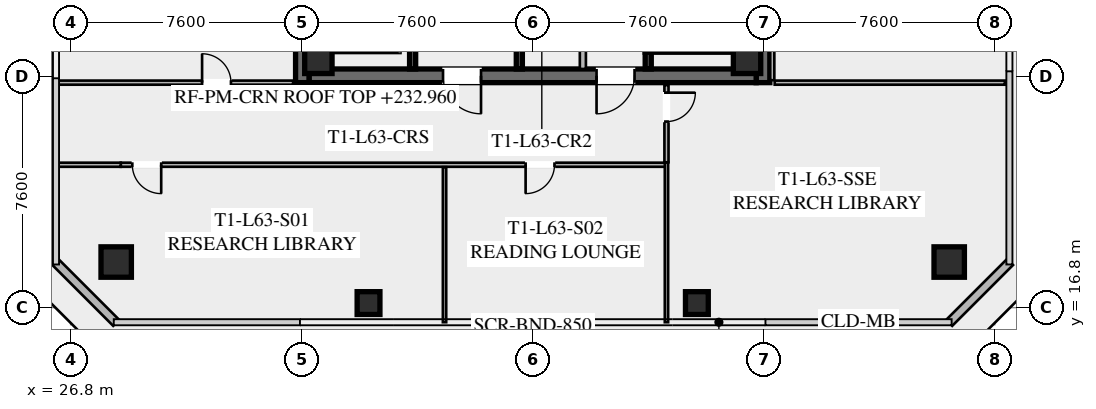
"""IFC4 building model, lengths in metres.
Left out: names, types, materials, properties, quantities, classifications, styles, units other than length and angle.
Written with IfcOpenShell. Run it as: python <this file> out.ifc"""

import sys

from ifc_helpers import new_model, si_unit, direction, frame, frame_2d, origin, origin_2d, place, context, subcontext, project, spatial, rectangle, hollow_rectangle, extrude, element, fill, save


model = new_model("IFC4")
c1 = context("Model", 3, precision=1e-05, world=origin(), true_north=direction((0.0, 1.0)))
c2 = subcontext(c1, "Body", "Model", "MODEL_VIEW")
j1 = project(units=[si_unit("LENGTHUNIT", "METRE"), si_unit("PLANEANGLEUNIT", "RADIAN")], contexts=[c1])
p1 = place(None, origin())
s1 = spatial("IfcSite", under=j1, at=p1, CompositionType="ELEMENT")
p2 = place(p1, origin())
s2 = spatial("IfcBuilding", under=s1, at=p2, CompositionType="ELEMENT")
p3 = place(p2, frame((0.0, 0.0, 232.6)))
s3 = spatial("IfcBuildingStorey", under=s2, at=p3, CompositionType="ELEMENT", Elevation=232.6)
for number, where, z_axis, x_axis in (
    (1, (34.425, 24.2, 0.0), (0.0, 0.0, 1.0), (0.0, 1.0, 0.0)),
    (2, (49.575, 39.8, 0.0), (0.0, 0.0, 1.0), (0.0, -1.0, 0.0)),
):
    element("IfcWall", number, at=place(p3, frame(where, z_axis=z_axis, x_axis=x_axis)), inside=s3, PredefinedType="SHEAR", context=c2, shape_type="SweptSolid", body=[
        extrude(rectangle(XDim=15.6, YDim=0.45, at=frame_2d((7.8, 0.0))), origin(), (0.0, 0.0, 1.0), 3.55),
    ])
p4 = place(p3, frame((49.35, 24.425, 0.0), z_axis=(0.0, 0.0, 1.0), x_axis=(-1.0, 0.0, 0.0)))
e3 = element("IfcWall", 3, at=p4, inside=s3, PredefinedType="SHEAR", context=c2, shape_type="SweptSolid", body=[
    extrude(rectangle(XDim=14.7, YDim=0.45, at=frame_2d((7.35, 0.0))), origin(), (0.0, 0.0, 1.0), 3.55),
])
p5 = place(p4, frame((9.05, 0.0, 0.0)))
e4 = element("IfcOpeningElement", 4, at=p5, cuts=e3, PredefinedType="OPENING", context=c2, shape_type="SweptSolid", body=[
    extrude(rectangle(XDim=1.25, YDim=2.25, at=frame_2d((0.625, 1.125))), frame((0.0, 0.235, 0.0), z_axis=(0.0, -1.0, 0.0), x_axis=(1.0, 0.0, 0.0)), (0.0, 0.0, 1.0), 0.47),
])
p6 = place(p4, frame((4.0, 0.0, 0.0)))
e5 = element("IfcOpeningElement", 5, at=p6, cuts=e3, PredefinedType="OPENING", context=c2, shape_type="SweptSolid", body=[
    extrude(rectangle(XDim=1.25, YDim=2.25, at=frame_2d((0.625, 1.125))), frame((0.0, 0.235, 0.0), z_axis=(0.0, -1.0, 0.0), x_axis=(1.0, 0.0, 0.0)), (0.0, 0.0, 1.0), 0.47),
])
for number, where, z_axis, x_axis in (
    (6, (34.95, 24.95, 0.0), (0.0, 0.0, 1.0), (1.0, 0.0, 0.0)),
    (7, (49.05, 24.95, 0.0), (0.0, 0.0, 1.0), (1.0, 0.0, 0.0)),
):
    element("IfcColumn", number, at=place(p3, frame(where, z_axis=z_axis, x_axis=x_axis)), inside=s3, PredefinedType="COLUMN", context=c2, shape_type="SweptSolid", body=[
        extrude(hollow_rectangle(XDim=0.9, YDim=0.9, WallThickness=0.04, at=origin_2d()), origin(), (0.0, 0.0, 1.0), 3.37),
    ])
for number, where, z_axis, x_axis in (
    (8, (28.3, 18.3, -0.175), (0.0, 0.0, 1.0), (1.0, 0.0, 0.0)),
    (9, (55.7, 18.3, -0.175), (0.0, 0.0, 1.0), (1.0, 0.0, 0.0)),
):
    element("IfcColumn", number, at=place(p3, frame(where, z_axis=z_axis, x_axis=x_axis)), inside=s3, PredefinedType="COLUMN", context=c2, shape_type="SweptSolid", body=[
        extrude(hollow_rectangle(XDim=1.0, YDim=1.0, WallThickness=0.04, at=origin_2d()), origin(), (0.0, 0.0, 1.0), 3.545),
    ])
for number, where, z_axis, x_axis in (
    (10, (36.6, 16.95, -0.175), (0.0, 0.0, 1.0), (1.0, 0.0, 0.0)),
    (11, (47.4, 16.95, -0.175), (0.0, 0.0, 1.0), (1.0, 0.0, 0.0)),
):
    element("IfcColumn", number, at=place(p3, frame(where, z_axis=z_axis, x_axis=x_axis)), inside=s3, PredefinedType="COLUMN", context=c2, shape_type="SweptSolid", body=[
        extrude(hollow_rectangle(XDim=0.75, YDim=0.75, WallThickness=0.032, at=origin_2d()), origin(), (0.0, 0.0, 1.0), 3.545),
    ])
for number, where, z_axis, x_axis in (
    (12, (28.3, 16.3, 0.0), (0.0, 0.0, 1.0), (-0.707, 0.707, 0.0)),
    (13, (57.7, 18.3, 0.0), (0.0, 0.0, 1.0), (-0.707, -0.707, 0.0)),
):
    element("IfcWall", number, at=place(p3, frame(where, z_axis=z_axis, x_axis=x_axis)), inside=s3, PredefinedType="SOLIDWALL", context=c2, shape_type="SweptSolid", body=[
        extrude(rectangle(XDim=2.828, YDim=0.28, at=frame_2d((1.414, 0.0))), origin(), (0.0, 0.0, 1.0), 3.37),
    ])
p7 = place(p3, frame((45.8, 32.8, 0.0), z_axis=(0.0, 0.0, 1.0), x_axis=(0.0, -1.0, 0.0)))
e14 = element("IfcWall", 14, at=p7, inside=s3, PredefinedType="SHEAR", context=c2, shape_type="SweptSolid", body=[
    extrude(rectangle(XDim=8.15, YDim=0.2, at=frame_2d((4.075, 0.0))), origin(), (0.0, 0.0, 1.0), 3.37),
])
p8 = place(p7, frame((0.45, 0.0, 0.0)))
e15 = element("IfcOpeningElement", 15, at=p8, cuts=e14, PredefinedType="OPENING", context=c2, shape_type="SweptSolid", body=[
    extrude(rectangle(XDim=1.15, YDim=2.2, at=frame_2d((0.575, 1.1))), frame((0.0, 0.11, 0.0), z_axis=(0.0, -1.0, 0.0), x_axis=(1.0, 0.0, 0.0)), (0.0, 0.0, 1.0), 0.22),
])
p9 = place(p3, frame((41.56, 24.65, 0.0), z_axis=(0.0, 0.0, 1.0), x_axis=(0.0, 1.0, 0.0)))
e16 = element("IfcWall", 16, at=p9, inside=s3, PredefinedType="SHEAR", context=c2, shape_type="SweptSolid", body=[
    extrude(rectangle(XDim=14.7, YDim=0.2, at=frame_2d((7.35, 0.0))), origin(), (0.0, 0.0, 1.0), 3.37),
])
p10 = place(p3, frame((38.05, 24.65, 0.0), z_axis=(0.0, 0.0, 1.0), x_axis=(0.0, 1.0, 0.0)))
e17 = element("IfcWall", 17, at=p10, inside=s3, PredefinedType="SHEAR", context=c2, shape_type="SweptSolid", body=[
    extrude(rectangle(XDim=6.55, YDim=0.2, at=frame_2d((3.275, 0.0))), origin(), (0.0, 0.0, 1.0), 3.37),
])
p11 = place(p10, frame((4.975, 0.0, 0.0)))
e18 = element("IfcOpeningElement", 18, at=p11, cuts=e17, PredefinedType="OPENING", context=c2, shape_type="SweptSolid", body=[
    extrude(rectangle(XDim=1.3, YDim=2.25, at=frame_2d((0.65, 1.125))), frame((0.0, 0.11, 0.0), z_axis=(0.0, -1.0, 0.0), x_axis=(1.0, 0.0, 0.0)), (0.0, 0.0, 1.0), 0.22),
])
p12 = place(p10, frame((2.975, 0.0, 0.0)))
e19 = element("IfcOpeningElement", 19, at=p12, cuts=e17, PredefinedType="OPENING", context=c2, shape_type="SweptSolid", body=[
    extrude(rectangle(XDim=1.3, YDim=2.25, at=frame_2d((0.65, 1.125))), frame((0.0, 0.11, 0.0), z_axis=(0.0, -1.0, 0.0), x_axis=(1.0, 0.0, 0.0)), (0.0, 0.0, 1.0), 0.22),
])
p13 = place(p10, frame((0.775, 0.0, 0.0)))
e20 = element("IfcOpeningElement", 20, at=p13, cuts=e17, PredefinedType="OPENING", context=c2, shape_type="SweptSolid", body=[
    extrude(rectangle(XDim=1.3, YDim=2.25, at=frame_2d((0.65, 1.125))), frame((0.0, 0.11, 0.0), z_axis=(0.0, -1.0, 0.0), x_axis=(1.0, 0.0, 0.0)), (0.0, 0.0, 1.0), 0.22),
])
p14 = place(p3, frame((43.65, 24.65, 0.0), z_axis=(0.0, 0.0, 1.0), x_axis=(0.0, 1.0, 0.0)))
e21 = element("IfcWall", 21, at=p14, inside=s3, PredefinedType="SOLIDWALL", context=c2, shape_type="SweptSolid", body=[
    extrude(rectangle(XDim=7.0, YDim=0.2, at=frame_2d((3.5, 0.0))), origin(), (0.0, 0.0, 1.0), 2.723),
])
p15 = place(p14, frame((0.85, 0.0, 0.0)))
e22 = element("IfcOpeningElement", 22, at=p15, cuts=e21, PredefinedType="OPENING", context=c2, shape_type="SweptSolid", body=[
    extrude(rectangle(XDim=0.95, YDim=2.05, at=frame_2d((0.475, 1.025))), frame((0.0, 0.11, 0.0), z_axis=(0.0, -1.0, 0.0), x_axis=(1.0, 0.0, 0.0)), (0.0, 0.0, 1.0), 0.22),
])
p16 = place(p14, frame((4.8, 0.0, 0.0)))
e23 = element("IfcOpeningElement", 23, at=p16, cuts=e21, PredefinedType="OPENING", context=c2, shape_type="SweptSolid", body=[
    extrude(rectangle(XDim=1.05, YDim=2.2, at=frame_2d((0.525, 1.1))), frame((0.0, 0.11, 0.0), z_axis=(0.0, -1.0, 0.0), x_axis=(1.0, 0.0, 0.0)), (0.0, 0.0, 1.0), 0.22),
])
p17 = place(p3, frame((46.4, 21.5, 0.0), z_axis=(0.0, 0.0, 1.0), x_axis=(-1.0, 0.0, 0.0)))
e24 = element("IfcWall", 24, at=p17, inside=s3, PredefinedType="PARTITIONING", context=c2, shape_type="SweptSolid", body=[
    extrude(rectangle(XDim=17.95, YDim=0.135, at=frame_2d((8.975, 0.0))), origin(), (0.0, 0.0, 1.0), 2.723),
])
p18 = place(p17, frame((16.62, 0.0, 0.0)))
e25 = element("IfcOpeningElement", 25, at=p18, cuts=e24, PredefinedType="OPENING", context=c2, shape_type="SweptSolid", body=[
    extrude(rectangle(XDim=0.95, YDim=2.05, at=frame_2d((0.475, 1.025))), frame((0.0, 0.077, 0.0), z_axis=(0.0, -1.0, 0.0), x_axis=(1.0, 0.0, 0.0)), (0.0, 0.0, 1.0), 0.155),
])
p19 = place(p17, frame((3.683, 0.0, 0.0)))
e26 = element("IfcOpeningElement", 26, at=p19, cuts=e24, PredefinedType="OPENING", context=c2, shape_type="SweptSolid", body=[
    extrude(rectangle(XDim=0.95, YDim=2.05, at=frame_2d((0.475, 1.025))), frame((0.0, 0.077, 0.0), z_axis=(0.0, -1.0, 0.0), x_axis=(1.0, 0.0, 0.0)), (0.0, 0.0, 1.0), 0.155),
])
p20 = place(p3, frame((26.32, 21.5, 0.0), z_axis=(0.0, 0.0, 1.0), x_axis=(1.0, 0.0, 0.0)))
e27 = element("IfcWall", 27, at=p20, inside=s3, PredefinedType="PARTITIONING", context=c2, shape_type="SweptSolid", body=[
    extrude(rectangle(XDim=2.13, YDim=0.135, at=frame_2d((1.065, 0.0))), origin(), (0.0, 0.0, 1.0), 2.723),
])
p21 = place(p3, frame((46.4, 24.12, 0.0), z_axis=(0.0, 0.0, 1.0), x_axis=(0.0, -1.0, 0.0)))
e28 = element("IfcWall", 28, at=p21, inside=s3, PredefinedType="PARTITIONING", context=c2, shape_type="SweptSolid", body=[
    extrude(rectangle(XDim=2.54, YDim=0.135, at=frame_2d((1.27, 0.0))), origin(), (0.0, 0.0, 1.0), 2.723),
])
p22 = place(p21, frame((0.25, 0.0, 0.0)))
e29 = element("IfcOpeningElement", 29, at=p22, cuts=e28, PredefinedType="OPENING", context=c2, shape_type="SweptSolid", body=[
    extrude(rectangle(XDim=0.95, YDim=2.05, at=frame_2d((0.475, 1.025))), frame((0.0, 0.077, 0.0), z_axis=(0.0, -1.0, 0.0), x_axis=(1.0, 0.0, 0.0)), (0.0, 0.0, 1.0), 0.155),
])
p23 = place(p3, frame((39.1, 16.32, 0.0), z_axis=(0.0, 0.0, 1.0), x_axis=(0.0, 1.0, 0.0)))
e30 = element("IfcWall", 30, at=p23, inside=s3, PredefinedType="PARTITIONING", context=c2, shape_type="SweptSolid", body=[
    extrude(rectangle(XDim=5.1, YDim=0.11, at=frame_2d((2.55, 0.0))), origin(), (0.0, 0.0, 1.0), 2.723),
])
p24 = place(p3, frame((46.4, 16.32, 0.0), z_axis=(0.0, 0.0, 1.0), x_axis=(0.0, 1.0, 0.0)))
e31 = element("IfcWall", 31, at=p24, inside=s3, PredefinedType="PARTITIONING", context=c2, shape_type="SweptSolid", body=[
    extrude(rectangle(XDim=5.26, YDim=0.11, at=frame_2d((2.63, 0.0))), origin(), (0.0, 0.0, 1.0), 2.723),
])
p25 = place(p3, frame((49.88, 39.72, 0.0), z_axis=(0.0, 0.0, 1.0), x_axis=(0.0, -1.0, 0.0)))
e32 = element("IfcWall", 32, at=p25, inside=s3, PredefinedType="PARTITIONING", context=c2, shape_type="SweptSolid", body=[
    extrude(rectangle(XDim=15.44, YDim=0.135, at=frame_2d((7.72, 0.0))), origin(), (0.0, 0.0, 1.0), 2.723),
])
p26 = place(p3, frame((49.96, 24.2, 0.0), z_axis=(0.0, 0.0, 1.0), x_axis=(1.0, 0.0, 0.0)))
e33 = element("IfcWall", 33, at=p26, inside=s3, PredefinedType="PARTITIONING", context=c2, shape_type="SweptSolid", body=[
    extrude(rectangle(XDim=7.57, YDim=0.135, at=frame_2d((3.785, 0.0))), origin(), (0.0, 0.0, 1.0), 2.723),
])
p27 = place(p3, frame((26.32, 24.2, 0.0), z_axis=(0.0, 0.0, 1.0), x_axis=(1.0, 0.0, 0.0)))
e34 = element("IfcWall", 34, at=p27, inside=s3, PredefinedType="PARTITIONING", context=c2, shape_type="SweptSolid", body=[
    extrude(rectangle(XDim=7.8, YDim=0.135, at=frame_2d((3.9, 0.0))), origin(), (0.0, 0.0, 1.0), 2.723),
])
p28 = place(p27, frame((4.805, 0.0, 0.0)))
e35 = element("IfcOpeningElement", 35, at=p28, cuts=e34, PredefinedType="OPENING", context=c2, shape_type="SweptSolid", body=[
    extrude(rectangle(XDim=0.95, YDim=2.05, at=frame_2d((0.475, 1.025))), frame((0.0, 0.077, 0.0), z_axis=(0.0, -1.0, 0.0), x_axis=(1.0, 0.0, 0.0)), (0.0, 0.0, 1.0), 0.155),
])
p29 = place(p5, origin())
e36 = element("IfcDoor", 36, at=p29, inside=s3, OperationType="SINGLE_SWING_LEFT", PredefinedType="DOOR", context=c2, shape_type="SweptSolid", body=[
    extrude(rectangle(XDim=1.25, YDim=2.25, at=frame_2d((0.625, 1.125))), frame((0.0, 0.025, 0.0), z_axis=(0.0, -1.0, 0.0), x_axis=(1.0, 0.0, 0.0)), (0.0, 0.0, 1.0), 0.05),
])
fill(e4, e36)
p30 = place(p6, origin())
e37 = element("IfcDoor", 37, at=p30, inside=s3, OperationType="SINGLE_SWING_RIGHT", PredefinedType="DOOR", context=c2, shape_type="SweptSolid", body=[
    extrude(rectangle(XDim=1.25, YDim=2.25, at=frame_2d((0.625, 1.125))), frame((0.0, 0.025, 0.0), z_axis=(0.0, -1.0, 0.0), x_axis=(1.0, 0.0, 0.0)), (0.0, 0.0, 1.0), 0.05),
])
fill(e5, e37)
p31 = place(p18, origin())
e38 = element("IfcDoor", 38, at=p31, inside=s3, OperationType="SINGLE_SWING_LEFT", PredefinedType="DOOR", context=c2, shape_type="SweptSolid", body=[
    extrude(rectangle(XDim=0.95, YDim=2.05, at=frame_2d((0.475, 1.025))), frame((0.0, 0.025, 0.0), z_axis=(0.0, -1.0, 0.0), x_axis=(1.0, 0.0, 0.0)), (0.0, 0.0, 1.0), 0.05),
])
fill(e25, e38)
p32 = place(p19, origin())
e39 = element("IfcDoor", 39, at=p32, inside=s3, OperationType="SINGLE_SWING_RIGHT", PredefinedType="DOOR", context=c2, shape_type="SweptSolid", body=[
    extrude(rectangle(XDim=0.95, YDim=2.05, at=frame_2d((0.475, 1.025))), frame((0.0, 0.025, 0.0), z_axis=(0.0, -1.0, 0.0), x_axis=(1.0, 0.0, 0.0)), (0.0, 0.0, 1.0), 0.05),
])
fill(e26, e39)
p33 = place(p22, origin())
e40 = element("IfcDoor", 40, at=p33, inside=s3, OperationType="SINGLE_SWING_LEFT", PredefinedType="DOOR", context=c2, shape_type="SweptSolid", body=[
    extrude(rectangle(XDim=0.95, YDim=2.05, at=frame_2d((0.475, 1.025))), frame((0.0, 0.025, 0.0), z_axis=(0.0, -1.0, 0.0), x_axis=(1.0, 0.0, 0.0)), (0.0, 0.0, 1.0), 0.05),
])
fill(e29, e40)
p34 = place(p28, origin())
e41 = element("IfcDoor", 41, at=p34, inside=s3, OperationType="SINGLE_SWING_LEFT", PredefinedType="DOOR", context=c2, shape_type="SweptSolid", body=[
    extrude(rectangle(XDim=0.95, YDim=2.05, at=frame_2d((0.475, 1.025))), frame((0.0, 0.025, 0.0), z_axis=(0.0, -1.0, 0.0), x_axis=(1.0, 0.0, 0.0)), (0.0, 0.0, 1.0), 0.05),
])
fill(e35, e41)
save(model, sys.argv[1])
